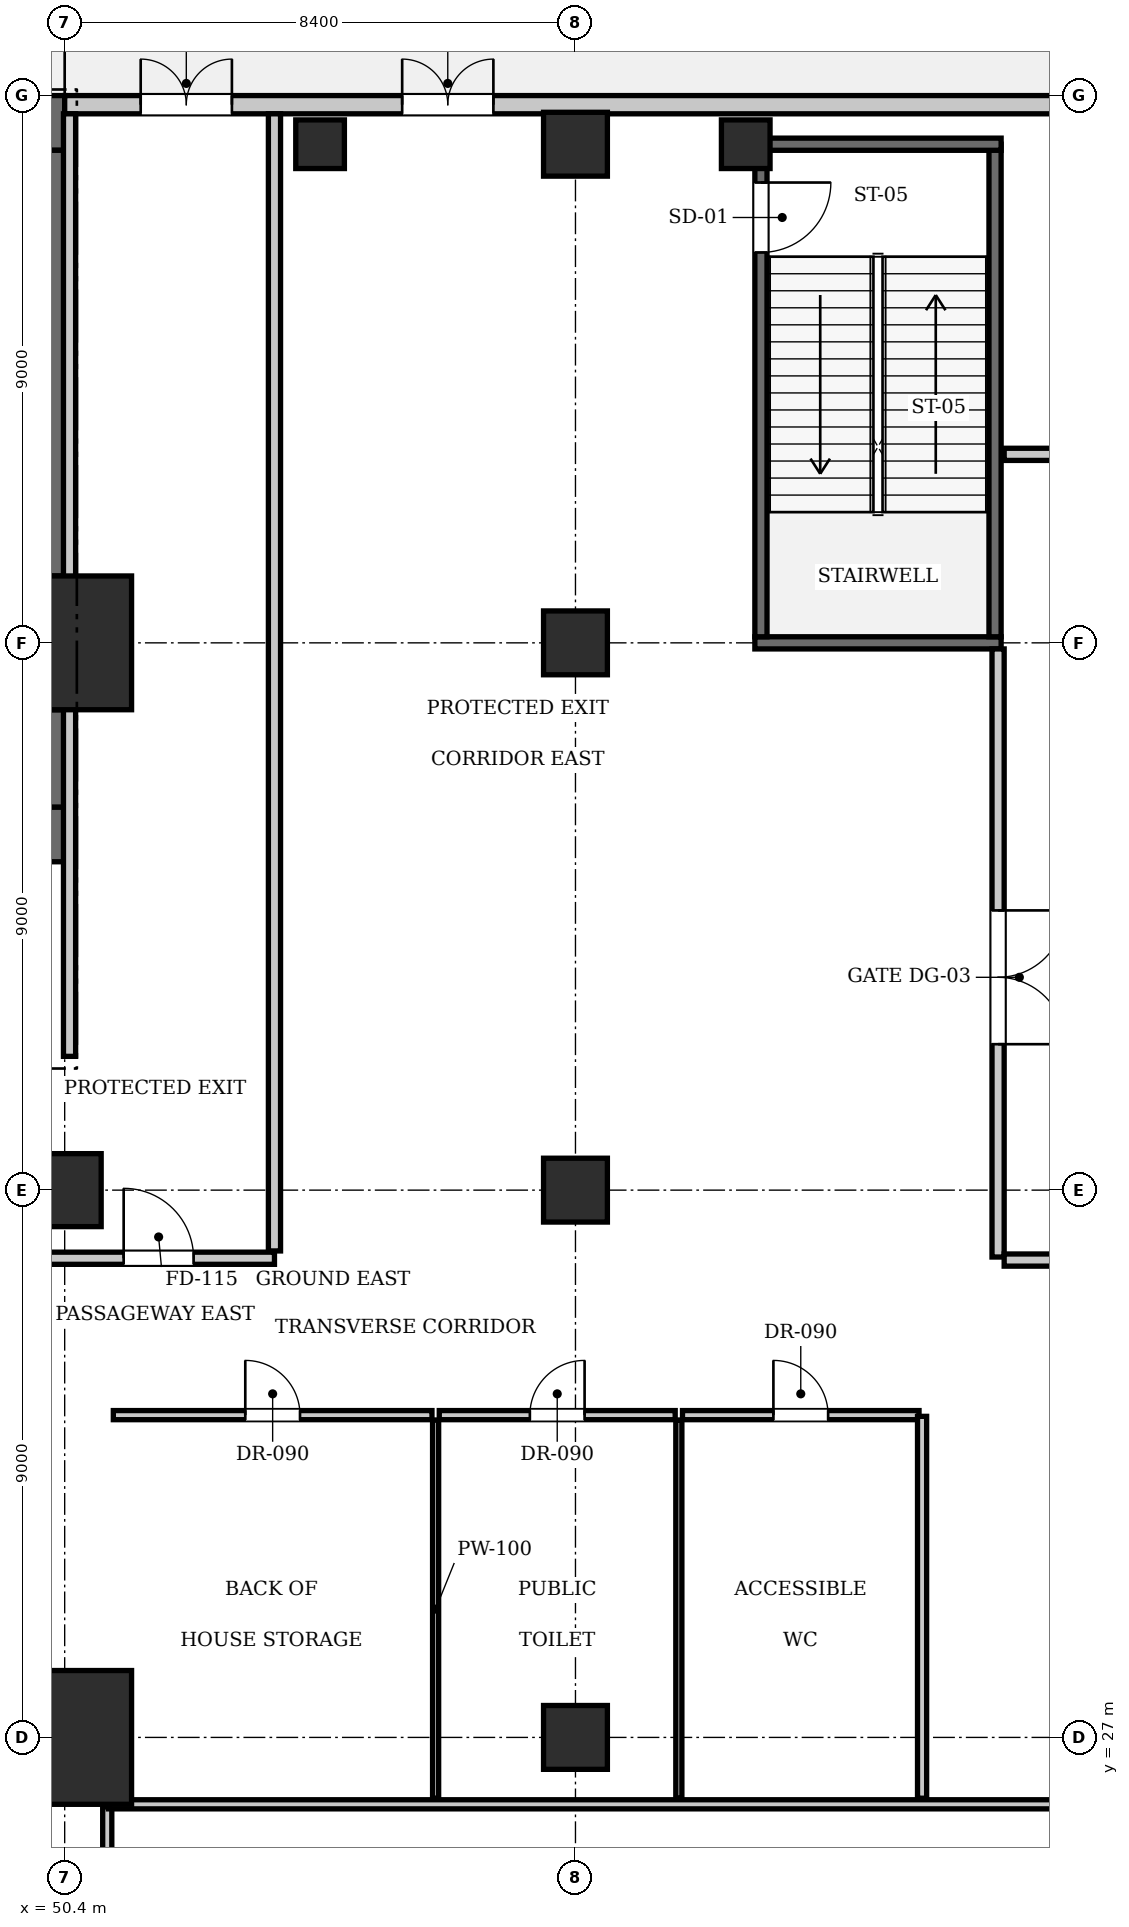
"""IFC4 building model, lengths in metres.
Left out: names, types, materials, properties, quantities, classifications, styles, units other than length and angle.
Written with IfcOpenShell. Run it as: python <this file> out.ifc"""

import sys

from ifc_helpers import new_model, si_unit, direction, frame, frame_2d, origin, origin_2d, place, context, subcontext, project, spatial, rectangle, extrude, element, fill, save


model = new_model("IFC4")
c1 = context("Model", 3, precision=1e-05, world=origin(), true_north=direction((0.0, 1.0)))
c2 = subcontext(c1, "Body", "Model", "MODEL_VIEW")
j1 = project(units=[si_unit("LENGTHUNIT", "METRE"), si_unit("PLANEANGLEUNIT", "RADIAN")], contexts=[c1])
p1 = place(None, origin())
s1 = spatial("IfcSite", under=j1, at=p1, CompositionType="ELEMENT")
p2 = place(p1, origin())
s2 = spatial("IfcBuilding", under=s1, at=p2, CompositionType="ELEMENT")
p3 = place(p2, origin())
s3 = spatial("IfcBuildingStorey", under=s2, at=p3, CompositionType="ELEMENT", Elevation=0.0)
for number, where, z_axis, x_axis in (
    (1, (50.4, 27.0, 0.0), (0.0, 0.0, 1.0), (1.0, 0.0, 0.0)),
    (2, (50.4, 45.0, 0.0), (0.0, 0.0, 1.0), (1.0, 0.0, 0.0)),
):
    element("IfcColumn", number, at=place(p3, frame(where, z_axis=z_axis, x_axis=x_axis)), inside=s3, PredefinedType="COLUMN", context=c2, shape_type="SweptSolid", body=[
        extrude(rectangle(XDim=2.2, YDim=2.2, at=origin_2d()), origin(), (0.0, 0.0, 1.0), 5.6),
    ])
p4 = place(p3, frame((25.2, 53.55, 0.0), z_axis=(0.0, 0.0, 1.0), x_axis=(1.0, 0.0, 0.0)))
e3 = element("IfcWall", 3, at=p4, inside=s3, PredefinedType="SHEAR", context=c2, shape_type="SweptSolid", body=[
    extrude(rectangle(XDim=25.2, YDim=0.9, at=frame_2d((12.6, 0.0))), origin(), (0.0, 0.0, 1.0), 5.6),
])
p5 = place(p3, frame((43.6, 41.85, 0.0), z_axis=(0.0, 0.0, 1.0), x_axis=(1.0, 0.0, 0.0)))
e4 = element("IfcWall", 4, at=p5, inside=s3, PredefinedType="SHEAR", context=c2, shape_type="SweptSolid", body=[
    extrude(rectangle(XDim=6.8, YDim=0.9, at=frame_2d((3.4, 0.0))), origin(), (0.0, 0.0, 1.0), 5.6),
])
p6 = place(p5, frame((3.9, 0.0, 0.0)))
e5 = element("IfcOpeningElement", 5, at=p6, cuts=e4, PredefinedType="OPENING", context=c2, shape_type="SweptSolid", body=[
    extrude(rectangle(XDim=1.15, YDim=2.15, at=frame_2d((0.575, 1.075))), frame((0.0, 0.46, 0.0), z_axis=(0.0, -1.0, 0.0), x_axis=(1.0, 0.0, 0.0)), (0.0, 0.0, 1.0), 0.92),
])
p7 = place(p5, frame((0.55, 0.0, 0.0)))
e6 = element("IfcOpeningElement", 6, at=p7, cuts=e4, PredefinedType="OPENING", context=c2, shape_type="SweptSolid", body=[
    extrude(rectangle(XDim=1.1, YDim=2.2, at=frame_2d((0.55, 1.1))), frame((0.0, 0.46, 0.0), z_axis=(0.0, -1.0, 0.0), x_axis=(1.0, 0.0, 0.0)), (0.0, 0.0, 1.0), 0.92),
])
p8 = place(p3, frame((49.95, 42.3, 0.0), z_axis=(0.0, 0.0, 1.0), x_axis=(0.0, 1.0, 0.0)))
e7 = element("IfcWall", 7, at=p8, inside=s3, PredefinedType="SHEAR", context=c2, shape_type="SweptSolid", body=[
    extrude(rectangle(XDim=1.6, YDim=0.9, at=frame_2d((0.8, 0.0))), origin(), (0.0, 0.0, 1.0), 5.6),
])
p9 = place(p3, frame((49.95, 46.1, 0.0), z_axis=(0.0, 0.0, 1.0), x_axis=(0.0, 1.0, 0.0)))
e8 = element("IfcWall", 8, at=p9, inside=s3, PredefinedType="SHEAR", context=c2, shape_type="SweptSolid", body=[
    extrude(rectangle(XDim=7.0, YDim=0.9, at=frame_2d((3.5, 0.0))), origin(), (0.0, 0.0, 1.0), 5.6),
])
p10 = place(p3, frame((50.4, 36.0, 0.0), z_axis=(0.0, 0.0, 1.0), x_axis=(1.0, 0.0, 0.0)))
e9 = element("IfcColumn", 9, at=p10, inside=s3, PredefinedType="COLUMN", context=c2, shape_type="SweptSolid", body=[
    extrude(rectangle(XDim=1.2, YDim=1.2, at=origin_2d()), origin(), (0.0, 0.0, 1.0), 5.6),
])
for number, where, z_axis, x_axis in (
    (10, (58.8, 27.0, 0.0), (0.0, 0.0, 1.0), (1.0, 0.0, 0.0)),
    (11, (58.8, 36.0, 0.0), (0.0, 0.0, 1.0), (1.0, 0.0, 0.0)),
    (12, (58.8, 45.0, 0.0), (0.0, 0.0, 1.0), (1.0, 0.0, 0.0)),
    (13, (58.8, 53.2, 0.0), (0.0, 0.0, 1.0), (1.0, 0.0, 0.0)),
):
    element("IfcColumn", number, at=place(p3, frame(where, z_axis=z_axis, x_axis=x_axis)), inside=s3, PredefinedType="COLUMN", context=c2, shape_type="SweptSolid", body=[
        extrude(rectangle(XDim=1.05, YDim=1.05, at=origin_2d()), origin(), (0.0, 0.0, 1.0), 5.6),
    ])
for number, where, z_axis, x_axis in (
    (14, (54.6, 53.2, 0.0), (0.0, 0.0, 1.0), (1.0, 0.0, 0.0)),
    (15, (61.6, 53.2, 0.0), (0.0, 0.0, 1.0), (1.0, 0.0, 0.0)),
):
    element("IfcColumn", number, at=place(p3, frame(where, z_axis=z_axis, x_axis=x_axis)), inside=s3, PredefinedType="PILASTER", context=c2, shape_type="SweptSolid", body=[
        extrude(rectangle(XDim=0.8, YDim=0.8, at=origin_2d()), origin(), (0.0, 0.0, 1.0), 5.6),
    ])
p11 = place(p3, frame((61.75, 45.0, 0.0), z_axis=(0.0, 0.0, 1.0), x_axis=(1.0, 0.0, 0.0)))
e16 = element("IfcWall", 16, at=p11, inside=s3, PredefinedType="SOLIDWALL", context=c2, shape_type="SweptSolid", body=[
    extrude(rectangle(XDim=4.05, YDim=0.2, at=frame_2d((2.025, 0.0))), origin(), (0.0, 0.0, 1.0), 4.685),
])
p12 = place(p3, frame((61.85, 45.1, 0.0), z_axis=(0.0, 0.0, 1.0), x_axis=(0.0, 1.0, 0.0)))
e17 = element("IfcWall", 17, at=p12, inside=s3, PredefinedType="SOLIDWALL", context=c2, shape_type="SweptSolid", body=[
    extrude(rectangle(XDim=8.1, YDim=0.2, at=frame_2d((4.05, 0.0))), origin(), (0.0, 0.0, 1.0), 5.32),
])
p13 = place(p12, frame((6.32, 0.0, 0.0)))
e18 = element("IfcOpeningElement", 18, at=p13, cuts=e17, PredefinedType="OPENING", context=c2, shape_type="SweptSolid", body=[
    extrude(rectangle(XDim=1.15, YDim=2.15, at=frame_2d((0.575, 1.075))), frame((0.0, 0.11, 0.0), z_axis=(0.0, -1.0, 0.0), x_axis=(1.0, 0.0, 0.0)), (0.0, 0.0, 1.0), 0.22),
])
p14 = place(p3, frame((65.7, 45.1, 0.0), z_axis=(0.0, 0.0, 1.0), x_axis=(0.0, 1.0, 0.0)))
e19 = element("IfcWall", 19, at=p14, inside=s3, PredefinedType="SOLIDWALL", context=c2, shape_type="SweptSolid", body=[
    extrude(rectangle(XDim=8.1, YDim=0.2, at=frame_2d((4.05, 0.0))), origin(), (0.0, 0.0, 1.0), 5.32),
])
p15 = place(p3, frame((61.75, 53.2, 0.0), z_axis=(0.0, 0.0, 1.0), x_axis=(1.0, 0.0, 0.0)))
e20 = element("IfcWall", 20, at=p15, inside=s3, PredefinedType="SOLIDWALL", context=c2, shape_type="SweptSolid", body=[
    extrude(rectangle(XDim=4.05, YDim=0.2, at=frame_2d((2.025, 0.0))), origin(), (0.0, 0.0, 1.0), 5.32),
])
p16 = place(p3, frame((50.4, 53.85, 0.0), z_axis=(0.0, 0.0, 1.0), x_axis=(1.0, 0.0, 0.0)))
e21 = element("IfcWall", 21, at=p16, inside=s3, PredefinedType="SOLIDWALL", context=c2, shape_type="SweptSolid", body=[
    extrude(rectangle(XDim=18.8, YDim=0.3, at=frame_2d((9.4, 0.0))), origin(), (0.0, 0.0, 1.0), 5.32),
])
p17 = place(p16, frame((1.25, 0.0, 0.0)))
e22 = element("IfcOpeningElement", 22, at=p17, cuts=e21, PredefinedType="OPENING", context=c2, shape_type="SweptSolid", body=[
    extrude(rectangle(XDim=1.5, YDim=2.2, at=frame_2d((0.75, 1.1))), frame((0.0, 0.16, 0.0), z_axis=(0.0, -1.0, 0.0), x_axis=(1.0, 0.0, 0.0)), (0.0, 0.0, 1.0), 0.32),
])
p18 = place(p16, frame((5.55, 0.0, 0.0)))
e23 = element("IfcOpeningElement", 23, at=p18, cuts=e21, PredefinedType="OPENING", context=c2, shape_type="SweptSolid", body=[
    extrude(rectangle(XDim=1.5, YDim=2.2, at=frame_2d((0.75, 1.1))), frame((0.0, 0.16, 0.0), z_axis=(0.0, -1.0, 0.0), x_axis=(1.0, 0.0, 0.0)), (0.0, 0.0, 1.0), 0.32),
])
p19 = place(p3, frame((43.65, 34.88, 0.0), z_axis=(0.0, 0.0, 1.0), x_axis=(1.0, 0.0, 0.0)))
e24 = element("IfcWall", 24, at=p19, inside=s3, PredefinedType="PARTITIONING", context=c2, shape_type="SweptSolid", body=[
    extrude(rectangle(XDim=10.2, YDim=0.2, at=frame_2d((5.1, 0.0))), origin(), (0.0, 0.0, 1.0), 5.32),
])
p20 = place(p19, frame((7.72, 0.0, 0.0)))
e25 = element("IfcOpeningElement", 25, at=p20, cuts=e24, PredefinedType="OPENING", context=c2, shape_type="SweptSolid", body=[
    extrude(rectangle(XDim=1.15, YDim=2.15, at=frame_2d((0.575, 1.075))), frame((0.0, 0.11, 0.0), z_axis=(0.0, -1.0, 0.0), x_axis=(1.0, 0.0, 0.0)), (0.0, 0.0, 1.0), 0.22),
])
p21 = place(p3, frame((53.85, 35.0, 0.0), z_axis=(0.0, 0.0, 1.0), x_axis=(0.0, 1.0, 0.0)))
e26 = element("IfcWall", 26, at=p21, inside=s3, PredefinedType="PARTITIONING", context=c2, shape_type="SweptSolid", body=[
    extrude(rectangle(XDim=18.7, YDim=0.2, at=frame_2d((9.35, 0.0))), origin(), (0.0, 0.0, 1.0), 5.32),
])
p22 = place(p3, frame((50.48, 38.2, 0.0), z_axis=(0.0, 0.0, 1.0), x_axis=(0.0, 1.0, 0.0)))
e27 = element("IfcWall", 27, at=p22, inside=s3, PredefinedType="PARTITIONING", context=c2, shape_type="SweptSolid", body=[
    extrude(rectangle(XDim=15.5, YDim=0.2, at=frame_2d((7.75, 0.0))), origin(), (0.0, 0.0, 1.0), 4.685),
])
p23 = place(p3, frame((51.1, 0.14, 0.0), z_axis=(0.0, 0.0, 1.0), x_axis=(0.0, 1.0, 0.0)))
e28 = element("IfcWall", 28, at=p23, inside=s3, PredefinedType="PARTITIONING", context=c2, shape_type="SweptSolid", body=[
    extrude(rectangle(XDim=25.72, YDim=0.15, at=frame_2d((12.86, 0.0))), origin(), (0.0, 0.0, 1.0), 5.32),
])
p24 = place(p23, frame((10.5, 0.0, 0.0)))
e29 = element("IfcOpeningElement", 29, at=p24, cuts=e28, PredefinedType="OPENING", context=c2, shape_type="SweptSolid", body=[
    extrude(rectangle(XDim=1.4, YDim=2.2, at=frame_2d((0.7, 1.1))), frame((0.0, 0.085, 0.0), z_axis=(0.0, -1.0, 0.0), x_axis=(1.0, 0.0, 0.0)), (0.0, 0.0, 1.0), 0.17),
])
p25 = place(p3, frame((51.12, 25.9, 0.0), z_axis=(0.0, 0.0, 1.0), x_axis=(1.0, 0.0, 0.0)))
e30 = element("IfcWall", 30, at=p25, inside=s3, PredefinedType="PARTITIONING", context=c2, shape_type="SweptSolid", body=[
    extrude(rectangle(XDim=24.34, YDim=0.15, at=frame_2d((12.17, 0.0))), origin(), (0.0, 0.0, 1.0), 5.32),
])
p26 = place(p3, frame((51.2, 32.3, 0.0), z_axis=(0.0, 0.0, 1.0), x_axis=(1.0, 0.0, 0.0)))
e31 = element("IfcWall", 31, at=p26, inside=s3, PredefinedType="PARTITIONING", context=c2, shape_type="SweptSolid", body=[
    extrude(rectangle(XDim=5.24, YDim=0.15, at=frame_2d((2.62, 0.0))), origin(), (0.0, 0.0, 1.0), 5.32),
])
p27 = place(p26, frame((2.17, 0.0, 0.0)))
e32 = element("IfcOpeningElement", 32, at=p27, cuts=e31, PredefinedType="OPENING", context=c2, shape_type="SweptSolid", body=[
    extrude(rectangle(XDim=0.9, YDim=2.1, at=frame_2d((0.45, 1.05))), frame((0.0, 0.085, 0.0), z_axis=(0.0, -1.0, 0.0), x_axis=(1.0, 0.0, 0.0)), (0.0, 0.0, 1.0), 0.17),
])
p28 = place(p3, frame((56.56, 32.3, 0.0), z_axis=(0.0, 0.0, 1.0), x_axis=(1.0, 0.0, 0.0)))
e33 = element("IfcWall", 33, at=p28, inside=s3, PredefinedType="PARTITIONING", context=c2, shape_type="SweptSolid", body=[
    extrude(rectangle(XDim=3.88, YDim=0.15, at=frame_2d((1.94, 0.0))), origin(), (0.0, 0.0, 1.0), 5.32),
])
p29 = place(p28, frame((1.49, 0.0, 0.0)))
e34 = element("IfcOpeningElement", 34, at=p29, cuts=e33, PredefinedType="OPENING", context=c2, shape_type="SweptSolid", body=[
    extrude(rectangle(XDim=0.9, YDim=2.1, at=frame_2d((0.45, 1.05))), frame((0.0, 0.085, 0.0), z_axis=(0.0, -1.0, 0.0), x_axis=(1.0, 0.0, 0.0)), (0.0, 0.0, 1.0), 0.17),
])
p30 = place(p3, frame((60.56, 32.3, 0.0), z_axis=(0.0, 0.0, 1.0), x_axis=(1.0, 0.0, 0.0)))
e35 = element("IfcWall", 35, at=p30, inside=s3, PredefinedType="PARTITIONING", context=c2, shape_type="SweptSolid", body=[
    extrude(rectangle(XDim=3.89, YDim=0.15, at=frame_2d((1.945, 0.0))), origin(), (0.0, 0.0, 1.0), 5.32),
])
p31 = place(p30, frame((1.495, 0.0, 0.0)))
e36 = element("IfcOpeningElement", 36, at=p31, cuts=e35, PredefinedType="OPENING", context=c2, shape_type="SweptSolid", body=[
    extrude(rectangle(XDim=0.9, YDim=2.1, at=frame_2d((0.45, 1.05))), frame((0.0, 0.085, 0.0), z_axis=(0.0, -1.0, 0.0), x_axis=(1.0, 0.0, 0.0)), (0.0, 0.0, 1.0), 0.17),
])
for number, where, z_axis, x_axis in (
    (37, (56.5, 26.0, 0.0), (0.0, 0.0, 1.0), (0.0, 1.0, 0.0)),
    (38, (60.5, 26.0, 0.0), (0.0, 0.0, 1.0), (0.0, 1.0, 0.0)),
):
    element("IfcWall", number, at=place(p3, frame(where, z_axis=z_axis, x_axis=x_axis)), inside=s3, PredefinedType="PARTITIONING", context=c2, shape_type="SweptSolid", body=[
        extrude(rectangle(XDim=6.22, YDim=0.1, at=frame_2d((3.11, 0.0))), origin(), (0.0, 0.0, 1.0), 5.32),
    ])
p32 = place(p3, frame((64.5, 26.0, 0.0), z_axis=(0.0, 0.0, 1.0), x_axis=(0.0, 1.0, 0.0)))
e39 = element("IfcWall", 39, at=p32, inside=s3, PredefinedType="PARTITIONING", context=c2, shape_type="SweptSolid", body=[
    extrude(rectangle(XDim=6.28, YDim=0.15, at=frame_2d((3.14, 0.0))), origin(), (0.0, 0.0, 1.0), 5.32),
])
p33 = place(p3, frame((65.75, 34.9, 0.0), z_axis=(0.0, 0.0, 1.0), x_axis=(0.0, 1.0, 0.0)))
e40 = element("IfcWall", 40, at=p33, inside=s3, PredefinedType="PARTITIONING", context=c2, shape_type="SweptSolid", body=[
    extrude(rectangle(XDim=10.0, YDim=0.2, at=frame_2d((5.0, 0.0))), origin(), (0.0, 0.0, 1.0), 5.32),
])
p34 = place(p33, frame((3.5, 0.0, 0.0)))
e41 = element("IfcOpeningElement", 41, at=p34, cuts=e40, PredefinedType="OPENING", context=c2, shape_type="SweptSolid", body=[
    extrude(rectangle(XDim=2.2, YDim=2.4, at=frame_2d((1.1, 1.2))), frame((0.0, 0.11, 0.0), z_axis=(0.0, -1.0, 0.0), x_axis=(1.0, 0.0, 0.0)), (0.0, 0.0, 1.0), 0.22),
])
for number, where, z_axis, x_axis in (
    (42, (65.85, 48.1, 0.0), (0.0, 0.0, 1.0), (1.0, 0.0, 0.0)),
    (43, (65.85, 34.85, 0.0), (0.0, 0.0, 1.0), (1.0, 0.0, 0.0)),
):
    element("IfcWall", number, at=place(p3, frame(where, z_axis=z_axis, x_axis=x_axis)), inside=s3, PredefinedType="PARTITIONING", context=c2, shape_type="SweptSolid", body=[
        extrude(rectangle(XDim=9.45, YDim=0.2, at=frame_2d((4.725, 0.0))), origin(), (0.0, 0.0, 1.0), 5.32),
    ])
p35 = place(p13, frame((1.15, 0.0, 0.0), z_axis=(0.0, 0.0, 1.0), x_axis=(-1.0, 0.0, 0.0)))
e44 = element("IfcDoor", 44, at=p35, inside=s3, OperationType="SINGLE_SWING_LEFT", PredefinedType="DOOR", context=c2, shape_type="SweptSolid", body=[
    extrude(rectangle(XDim=1.15, YDim=2.15, at=frame_2d((0.575, 1.075))), frame((0.0, 0.025, 0.0), z_axis=(0.0, -1.0, 0.0), x_axis=(1.0, 0.0, 0.0)), (0.0, 0.0, 1.0), 0.05),
])
fill(e18, e44)
p36 = place(p17, origin())
e45 = element("IfcDoor", 45, at=p36, inside=s3, OperationType="DOUBLE_DOOR_SINGLE_SWING", PredefinedType="DOOR", context=c2, shape_type="SweptSolid", body=[
    extrude(rectangle(XDim=1.5, YDim=2.2, at=frame_2d((0.75, 1.1))), frame((0.0, 0.025, 0.0), z_axis=(0.0, -1.0, 0.0), x_axis=(1.0, 0.0, 0.0)), (0.0, 0.0, 1.0), 0.05),
])
fill(e22, e45)
p37 = place(p18, origin())
e46 = element("IfcDoor", 46, at=p37, inside=s3, OperationType="DOUBLE_DOOR_SINGLE_SWING", PredefinedType="DOOR", context=c2, shape_type="SweptSolid", body=[
    extrude(rectangle(XDim=1.5, YDim=2.2, at=frame_2d((0.75, 1.1))), frame((0.0, 0.025, 0.0), z_axis=(0.0, -1.0, 0.0), x_axis=(1.0, 0.0, 0.0)), (0.0, 0.0, 1.0), 0.05),
])
fill(e23, e46)
p38 = place(p20, origin())
e47 = element("IfcDoor", 47, at=p38, inside=s3, OperationType="SINGLE_SWING_LEFT", PredefinedType="DOOR", context=c2, shape_type="SweptSolid", body=[
    extrude(rectangle(XDim=1.15, YDim=2.15, at=frame_2d((0.575, 1.075))), frame((0.0, 0.025, 0.0), z_axis=(0.0, -1.0, 0.0), x_axis=(1.0, 0.0, 0.0)), (0.0, 0.0, 1.0), 0.05),
])
fill(e25, e47)
p39 = place(p27, origin())
e48 = element("IfcDoor", 48, at=p39, inside=s3, OperationType="SINGLE_SWING_LEFT", PredefinedType="DOOR", context=c2, shape_type="SweptSolid", body=[
    extrude(rectangle(XDim=0.9, YDim=2.1, at=frame_2d((0.45, 1.05))), frame((0.0, 0.025, 0.0), z_axis=(0.0, -1.0, 0.0), x_axis=(1.0, 0.0, 0.0)), (0.0, 0.0, 1.0), 0.05),
])
fill(e32, e48)
p40 = place(p29, origin())
e49 = element("IfcDoor", 49, at=p40, inside=s3, OperationType="SINGLE_SWING_RIGHT", PredefinedType="DOOR", context=c2, shape_type="SweptSolid", body=[
    extrude(rectangle(XDim=0.9, YDim=2.1, at=frame_2d((0.45, 1.05))), frame((0.0, 0.025, 0.0), z_axis=(0.0, -1.0, 0.0), x_axis=(1.0, 0.0, 0.0)), (0.0, 0.0, 1.0), 0.05),
])
fill(e34, e49)
p41 = place(p31, origin())
e50 = element("IfcDoor", 50, at=p41, inside=s3, OperationType="SINGLE_SWING_LEFT", PredefinedType="DOOR", context=c2, shape_type="SweptSolid", body=[
    extrude(rectangle(XDim=0.9, YDim=2.1, at=frame_2d((0.45, 1.05))), frame((0.0, 0.025, 0.0), z_axis=(0.0, -1.0, 0.0), x_axis=(1.0, 0.0, 0.0)), (0.0, 0.0, 1.0), 0.05),
])
fill(e36, e50)
p42 = place(p34, frame((2.2, 0.0, 0.0), z_axis=(0.0, 0.0, 1.0), x_axis=(-1.0, 0.0, 0.0)))
e51 = element("IfcDoor", 51, at=p42, inside=s3, OperationType="DOUBLE_DOOR_SINGLE_SWING", PredefinedType="GATE", context=c2, shape_type="SweptSolid", body=[
    extrude(rectangle(XDim=2.2, YDim=2.4, at=frame_2d((1.1, 1.2))), frame((0.0, 0.025, 0.0), z_axis=(0.0, -1.0, 0.0), x_axis=(1.0, 0.0, 0.0)), (0.0, 0.0, 1.0), 0.05),
])
fill(e41, e51)
save(model, sys.argv[1])
